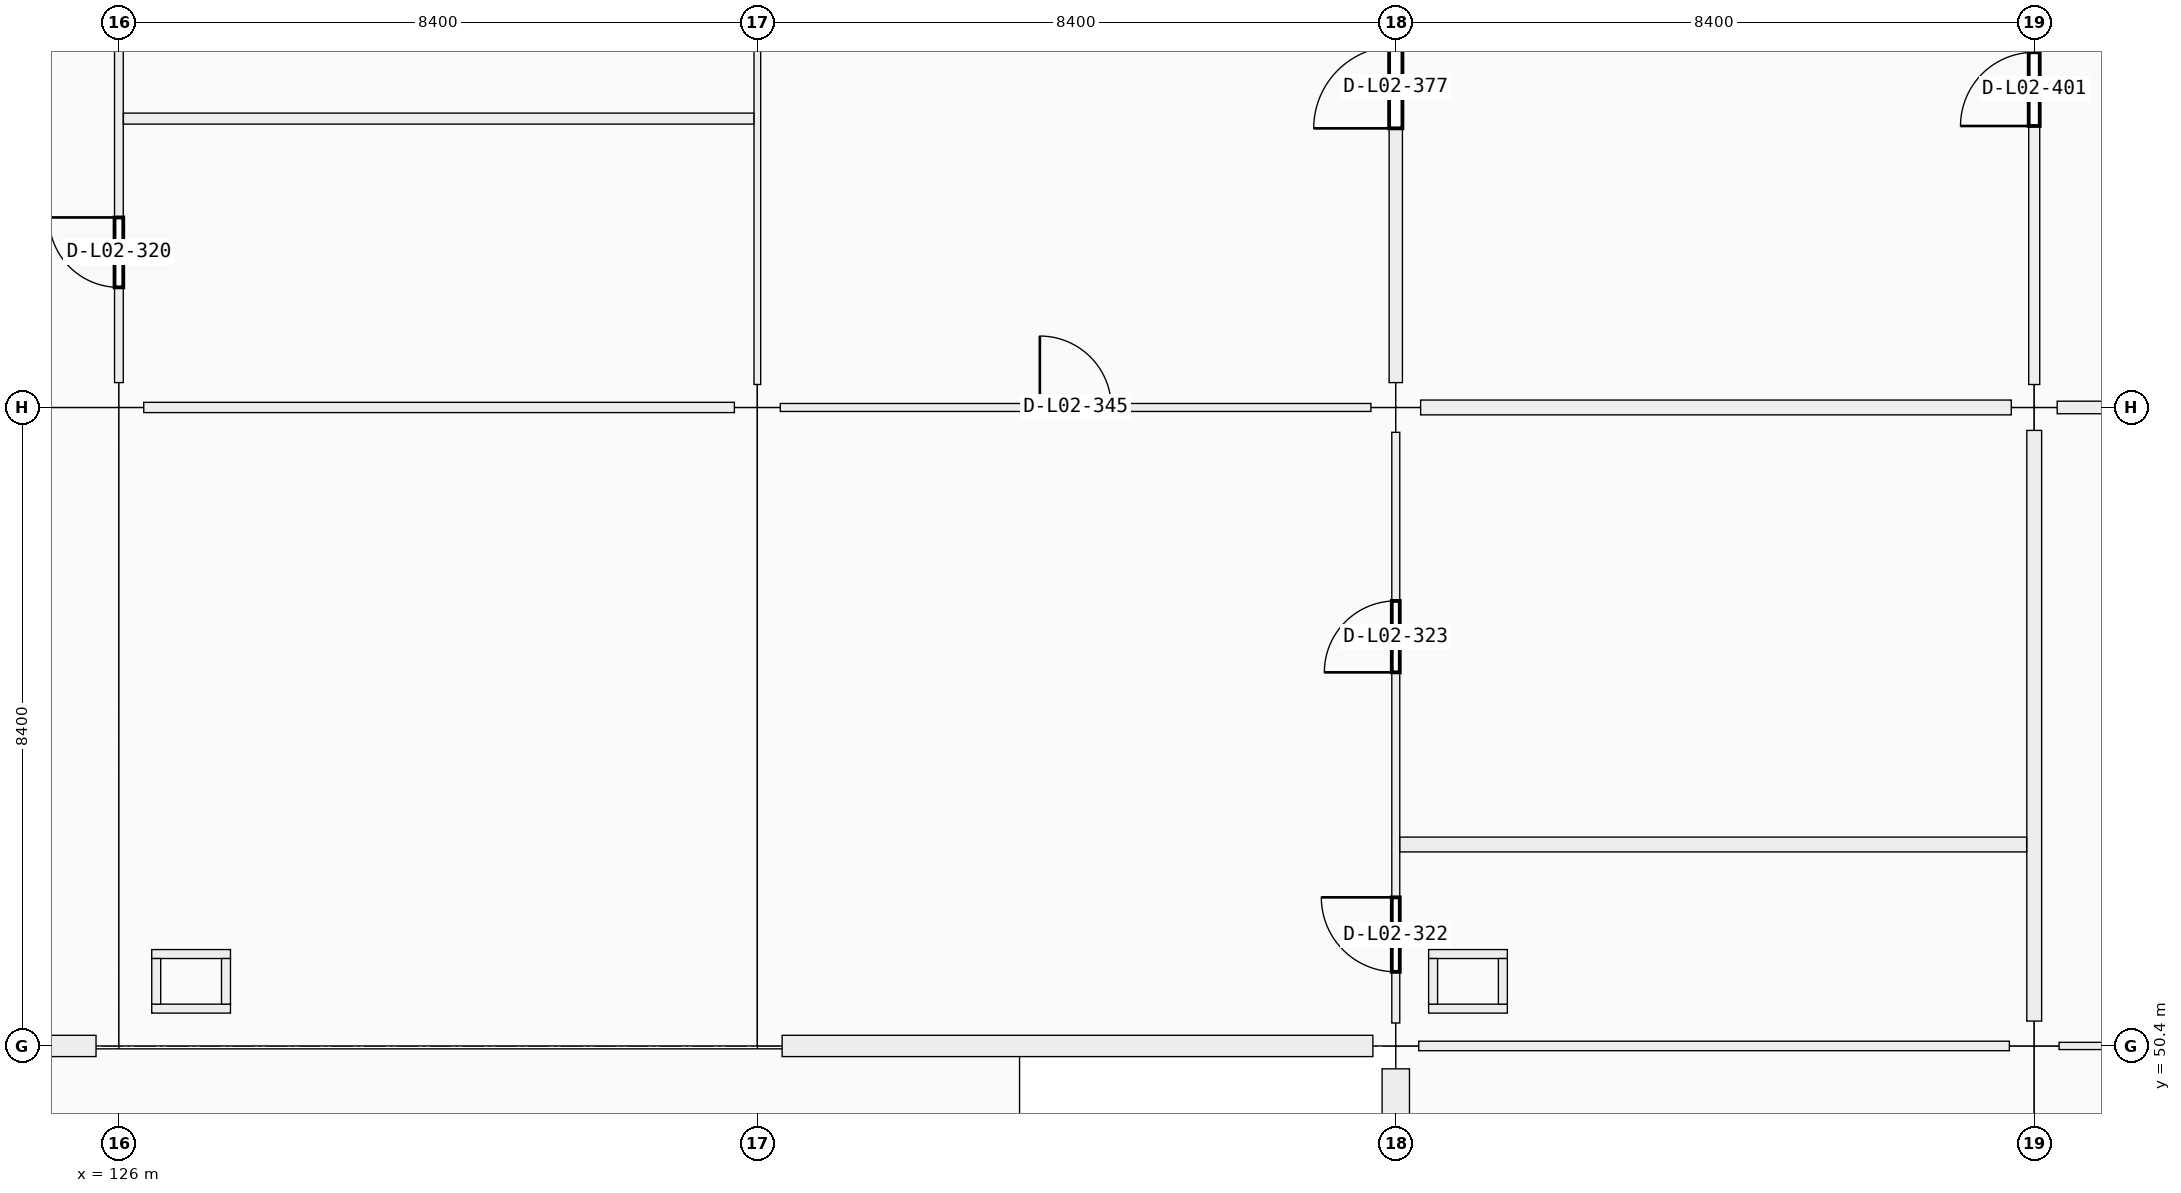
"""IFC4 building model, lengths in metres.
Left out: names, types, materials, properties, quantities, classifications, styles, units other than length and angle.
Written with IfcOpenShell. Run it as: python <this file> out.ifc"""

import sys

from ifc_helpers import new_model, si_unit, direction, frame, frame_2d, origin, origin_2d, place, context, subcontext, project, spatial, rectangle, extrude, element, fill, save


model = new_model("IFC4")
c1 = context("Model", 3, precision=1e-05, world=origin(), true_north=direction((0.0, 1.0)))
c2 = subcontext(c1, "Body", "Model", "MODEL_VIEW")
j1 = project(units=[si_unit("LENGTHUNIT", "METRE"), si_unit("PLANEANGLEUNIT", "RADIAN")], contexts=[c1])
p1 = place(None, origin())
s1 = spatial("IfcSite", under=j1, at=p1, CompositionType="ELEMENT")
p2 = place(p1, origin())
s2 = spatial("IfcBuilding", under=s1, at=p2, CompositionType="ELEMENT")
p3 = place(p2, frame((0.0, 0.0, 10.26)))
s3 = spatial("IfcBuildingStorey", under=s2, at=p3, CompositionType="ELEMENT", Elevation=10.26)
p4 = place(p3, frame((126.0, 50.4, 0.0), z_axis=(0.0, 0.0, 1.0), x_axis=(1.0, 0.0, 0.0)))
e1 = element("IfcColumn", 1, at=p4, inside=s3, PredefinedType="COLUMN", context=c2, shape_type="SweptSolid", body=[
    extrude(rectangle(XDim=0.6, YDim=0.6, at=origin_2d()), origin(), (0.0, 0.0, 1.0), 4.5),
])
for number, where, z_axis, x_axis in (
    (2, (126.0, 58.8, 0.0), (0.0, 0.0, 1.0), (1.0, 0.0, 0.0)),
    (3, (134.4, 50.4, 0.0), (0.0, 0.0, 1.0), (1.0, 0.0, 0.0)),
):
    element("IfcColumn", number, at=place(p3, frame(where, z_axis=z_axis, x_axis=x_axis)), inside=s3, PredefinedType="COLUMN", context=c2, shape_type="SweptSolid", body=[
        extrude(rectangle(XDim=0.65, YDim=0.65, at=origin_2d()), origin(), (0.0, 0.0, 1.0), 4.5),
    ])
for number, where, z_axis, x_axis in (
    (4, (134.4, 58.8, 0.0), (0.0, 0.0, 1.0), (1.0, 0.0, 0.0)),
    (5, (142.8, 50.4, 0.0), (0.0, 0.0, 1.0), (1.0, 0.0, 0.0)),
):
    element("IfcColumn", number, at=place(p3, frame(where, z_axis=z_axis, x_axis=x_axis)), inside=s3, PredefinedType="COLUMN", context=c2, shape_type="SweptSolid", body=[
        extrude(rectangle(XDim=0.6, YDim=0.6, at=origin_2d()), origin(), (0.0, 0.0, 1.0), 4.5),
    ])
for number, where, z_axis, x_axis in (
    (6, (142.8, 58.8, 0.0), (0.0, 0.0, 1.0), (1.0, 0.0, 0.0)),
    (7, (151.2, 50.4, 0.0), (0.0, 0.0, 1.0), (1.0, 0.0, 0.0)),
):
    element("IfcColumn", number, at=place(p3, frame(where, z_axis=z_axis, x_axis=x_axis)), inside=s3, PredefinedType="COLUMN", context=c2, shape_type="SweptSolid", body=[
        extrude(rectangle(XDim=0.65, YDim=0.65, at=origin_2d()), origin(), (0.0, 0.0, 1.0), 4.5),
    ])
p5 = place(p3, frame((151.2, 58.8, 0.0), z_axis=(0.0, 0.0, 1.0), x_axis=(1.0, 0.0, 0.0)))
e8 = element("IfcColumn", 8, at=p5, inside=s3, PredefinedType="COLUMN", context=c2, shape_type="SweptSolid", body=[
    extrude(rectangle(XDim=0.6, YDim=0.6, at=origin_2d()), origin(), (0.0, 0.0, 1.0), 4.5),
])
p6 = place(p3, frame((125.699, 50.4, 0.0), z_axis=(0.0, 0.0, 1.0), x_axis=(-1.0, 0.0, 0.0)))
e9 = element("IfcWall", 9, at=p6, inside=s3, PredefinedType="SOLIDWALL", context=c2, shape_type="SweptSolid", body=[
    extrude(rectangle(XDim=7.773, YDim=0.28, at=frame_2d((3.886, 0.0))), origin(), (0.0, 0.0, 1.0), 3.54),
])
p7 = place(p6, frame((2.611, 0.0, 0.9)))
e10 = element("IfcOpeningElement", 10, at=p7, cuts=e9, PredefinedType="OPENING", context=c2, shape_type="SweptSolid", body=[
    extrude(rectangle(XDim=2.55, YDim=1.95, at=frame_2d((1.275, 0.975))), frame((0.0, 0.14, 0.0), z_axis=(0.0, -1.0, 0.0), x_axis=(1.0, 0.0, 0.0)), (0.0, 0.0, 1.0), 0.28),
])
p8 = place(p3, frame((142.499, 50.4, 0.0), z_axis=(0.0, 0.0, 1.0), x_axis=(-1.0, 0.0, 0.0)))
e11 = element("IfcWall", 11, at=p8, inside=s3, PredefinedType="SOLIDWALL", context=c2, shape_type="SweptSolid", body=[
    extrude(rectangle(XDim=7.773, YDim=0.28, at=frame_2d((3.886, 0.0))), origin(), (0.0, 0.0, 1.0), 3.54),
])
p9 = place(p8, frame((2.911, 0.0, 0.9)))
e12 = element("IfcOpeningElement", 12, at=p9, cuts=e11, PredefinedType="OPENING", context=c2, shape_type="SweptSolid", body=[
    extrude(rectangle(XDim=1.95, YDim=1.6, at=frame_2d((0.975, 0.8))), frame((0.0, 0.14, 0.0), z_axis=(0.0, -1.0, 0.0), x_axis=(1.0, 0.0, 0.0)), (0.0, 0.0, 1.0), 0.28),
])
p10 = place(p3, frame((142.8, 42.326, 0.0), z_axis=(0.0, 0.0, 1.0), x_axis=(0.0, 1.0, 0.0)))
e13 = element("IfcWall", 13, at=p10, inside=s3, PredefinedType="SOLIDWALL", context=c2, shape_type="SweptSolid", body=[
    extrude(rectangle(XDim=7.773, YDim=0.36, at=frame_2d((3.887, 0.0))), origin(), (0.0, 0.0, 1.0), 3.54),
])
p11 = place(p10, frame((2.837, 0.0, 0.9)))
e14 = element("IfcOpeningElement", 14, at=p11, cuts=e13, PredefinedType="OPENING", context=c2, shape_type="SweptSolid", body=[
    extrude(rectangle(XDim=2.1, YDim=1.8, at=frame_2d((1.05, 0.9))), frame((0.0, 0.18, 0.0), z_axis=(0.0, -1.0, 0.0), x_axis=(1.0, 0.0, 0.0)), (0.0, 0.0, 1.0), 0.36),
])
for number, where, z_axis, x_axis in (
    (15, (126.432, 50.891, 0.0), (0.0, 0.0, 1.0), (1.0, 0.0, 0.0)),
    (16, (126.432, 51.609, 0.0), (0.0, 0.0, 1.0), (1.0, 0.0, 0.0)),
):
    element("IfcWall", number, at=place(p3, frame(where, z_axis=z_axis, x_axis=x_axis)), inside=s3, PredefinedType="PARTITIONING", context=c2, shape_type="SweptSolid", body=[
        extrude(rectangle(XDim=1.036, YDim=0.118, at=frame_2d((0.518, 0.0))), origin(), (0.0, 0.0, 1.0), 3.53),
    ])
for number, where, z_axis, x_axis in (
    (17, (126.491, 50.95, 0.0), (0.0, 0.0, 1.0), (0.0, 1.0, 0.0)),
    (18, (127.409, 50.95, 0.0), (0.0, 0.0, 1.0), (0.0, 1.0, 0.0)),
):
    element("IfcWall", number, at=place(p3, frame(where, z_axis=z_axis, x_axis=x_axis)), inside=s3, PredefinedType="PARTITIONING", context=c2, shape_type="SweptSolid", body=[
        extrude(rectangle(XDim=0.6, YDim=0.118, at=frame_2d((0.3, 0.0))), origin(), (0.0, 0.0, 1.0), 3.53),
    ])
for number, where, z_axis, x_axis in (
    (19, (143.232, 50.891, 0.0), (0.0, 0.0, 1.0), (1.0, 0.0, 0.0)),
    (20, (143.232, 51.609, 0.0), (0.0, 0.0, 1.0), (1.0, 0.0, 0.0)),
):
    element("IfcWall", number, at=place(p3, frame(where, z_axis=z_axis, x_axis=x_axis)), inside=s3, PredefinedType="PARTITIONING", context=c2, shape_type="SweptSolid", body=[
        extrude(rectangle(XDim=1.036, YDim=0.118, at=frame_2d((0.518, 0.0))), origin(), (0.0, 0.0, 1.0), 3.53),
    ])
for number, where, z_axis, x_axis in (
    (21, (143.291, 50.95, 0.0), (0.0, 0.0, 1.0), (0.0, 1.0, 0.0)),
    (22, (144.209, 50.95, 0.0), (0.0, 0.0, 1.0), (0.0, 1.0, 0.0)),
):
    element("IfcWall", number, at=place(p3, frame(where, z_axis=z_axis, x_axis=x_axis)), inside=s3, PredefinedType="PARTITIONING", context=c2, shape_type="SweptSolid", body=[
        extrude(rectangle(XDim=0.6, YDim=0.118, at=frame_2d((0.3, 0.0))), origin(), (0.0, 0.0, 1.0), 3.53),
    ])
p12 = place(p3, frame((126.327, 58.8, 0.0), z_axis=(0.0, 0.0, 1.0), x_axis=(1.0, 0.0, 0.0)))
e23 = element("IfcWall", 23, at=p12, inside=s3, PredefinedType="PARTITIONING", context=c2, shape_type="SweptSolid", body=[
    extrude(rectangle(XDim=7.771, YDim=0.135, at=frame_2d((3.885, 0.0))), origin(), (0.0, 0.0, 1.0), 3.37),
])
p13 = place(p3, frame((134.702, 58.8, 0.0), z_axis=(0.0, 0.0, 1.0), x_axis=(1.0, 0.0, 0.0)))
e24 = element("IfcWall", 24, at=p13, inside=s3, PredefinedType="PARTITIONING", context=c2, shape_type="SweptSolid", body=[
    extrude(rectangle(XDim=7.771, YDim=0.105, at=frame_2d((3.885, 0.0))), origin(), (0.0, 0.0, 1.0), 3.37),
])
p14 = place(p13, frame((3.415, 0.0, 0.0)))
e25 = element("IfcOpeningElement", 25, at=p14, cuts=e24, PredefinedType="OPENING", context=c2, shape_type="SweptSolid", body=[
    extrude(rectangle(XDim=0.94, YDim=2.15, at=frame_2d((0.47, 1.075))), frame((0.0, 0.052, 0.0), z_axis=(0.0, -1.0, 0.0), x_axis=(1.0, 0.0, 0.0)), (0.0, 0.0, 1.0), 0.105),
])
p15 = place(p3, frame((143.102, 50.4, 0.0), z_axis=(0.0, 0.0, 1.0), x_axis=(1.0, 0.0, 0.0)))
e26 = element("IfcWall", 26, at=p15, inside=s3, PredefinedType="PARTITIONING", context=c2, shape_type="SweptSolid", body=[
    extrude(rectangle(XDim=7.771, YDim=0.125, at=frame_2d((3.885, 0.0))), origin(), (0.0, 0.0, 1.0), 3.37),
])
p16 = place(p3, frame((143.127, 58.8, 0.0), z_axis=(0.0, 0.0, 1.0), x_axis=(1.0, 0.0, 0.0)))
e27 = element("IfcWall", 27, at=p16, inside=s3, PredefinedType="PARTITIONING", context=c2, shape_type="SweptSolid", body=[
    extrude(rectangle(XDim=7.771, YDim=0.195, at=frame_2d((3.885, 0.0))), origin(), (0.0, 0.0, 1.0), 3.37),
])
p17 = place(p3, frame((151.527, 50.4, 0.0), z_axis=(0.0, 0.0, 1.0), x_axis=(1.0, 0.0, 0.0)))
e28 = element("IfcWall", 28, at=p17, inside=s3, PredefinedType="PARTITIONING", context=c2, shape_type="SweptSolid", body=[
    extrude(rectangle(XDim=7.771, YDim=0.095, at=frame_2d((3.885, 0.0))), origin(), (0.0, 0.0, 1.0), 3.37),
])
p18 = place(p17, frame((3.405, 0.0, 0.0)))
e29 = element("IfcOpeningElement", 29, at=p18, cuts=e28, PredefinedType="OPENING", context=c2, shape_type="SweptSolid", body=[
    extrude(rectangle(XDim=0.96, YDim=2.18, at=frame_2d((0.48, 1.09))), frame((0.0, 0.047, 0.0), z_axis=(0.0, -1.0, 0.0), x_axis=(1.0, 0.0, 0.0)), (0.0, 0.0, 1.0), 0.095),
])
p19 = place(p3, frame((151.502, 58.8, 0.0), z_axis=(0.0, 0.0, 1.0), x_axis=(1.0, 0.0, 0.0)))
e30 = element("IfcWall", 30, at=p19, inside=s3, PredefinedType="PARTITIONING", context=c2, shape_type="SweptSolid", body=[
    extrude(rectangle(XDim=7.771, YDim=0.165, at=frame_2d((3.885, 0.0))), origin(), (0.0, 0.0, 1.0), 3.37),
])
p20 = place(p19, frame((3.415, 0.0, 0.0)))
e31 = element("IfcOpeningElement", 31, at=p20, cuts=e30, PredefinedType="OPENING", context=c2, shape_type="SweptSolid", body=[
    extrude(rectangle(XDim=0.94, YDim=2.15, at=frame_2d((0.47, 1.075))), frame((0.0, 0.083, 0.0), z_axis=(0.0, -1.0, 0.0), x_axis=(1.0, 0.0, 0.0)), (0.0, 0.0, 1.0), 0.165),
])
p21 = place(p3, frame((126.0, 59.127, 0.0), z_axis=(0.0, 0.0, 1.0), x_axis=(0.0, 1.0, 0.0)))
e32 = element("IfcWall", 32, at=p21, inside=s3, PredefinedType="PARTITIONING", context=c2, shape_type="SweptSolid", body=[
    extrude(rectangle(XDim=7.796, YDim=0.115, at=frame_2d((3.898, 0.0))), origin(), (0.0, 0.0, 1.0), 3.37),
])
p22 = place(p21, frame((1.253, 0.0, 0.0)))
e33 = element("IfcOpeningElement", 33, at=p22, cuts=e32, PredefinedType="OPENING", context=c2, shape_type="SweptSolid", body=[
    extrude(rectangle(XDim=0.92, YDim=2.15, at=frame_2d((0.46, 1.075))), frame((0.0, 0.058, 0.0), z_axis=(0.0, -1.0, 0.0), x_axis=(1.0, 0.0, 0.0)), (0.0, 0.0, 1.0), 0.115),
])
p23 = place(p21, frame((5.108, 0.0, 0.0)))
e34 = element("IfcOpeningElement", 34, at=p23, cuts=e32, PredefinedType="OPENING", context=c2, shape_type="SweptSolid", body=[
    extrude(rectangle(XDim=1.05, YDim=2.12, at=frame_2d((0.525, 1.06))), frame((0.0, 0.058, 0.0), z_axis=(0.0, -1.0, 0.0), x_axis=(1.0, 0.0, 0.0)), (0.0, 0.0, 1.0), 0.115),
])
p24 = place(p3, frame((134.4, 59.102, 0.0), z_axis=(0.0, 0.0, 1.0), x_axis=(0.0, 1.0, 0.0)))
e35 = element("IfcWall", 35, at=p24, inside=s3, PredefinedType="PARTITIONING", context=c2, shape_type="SweptSolid", body=[
    extrude(rectangle(XDim=7.821, YDim=0.088, at=frame_2d((3.911, 0.0))), origin(), (0.0, 0.0, 1.0), 3.37),
])
p25 = place(p3, frame((142.8, 50.702, 0.0), z_axis=(0.0, 0.0, 1.0), x_axis=(0.0, 1.0, 0.0)))
e36 = element("IfcWall", 36, at=p25, inside=s3, PredefinedType="PARTITIONING", context=c2, shape_type="SweptSolid", body=[
    extrude(rectangle(XDim=7.771, YDim=0.105, at=frame_2d((3.885, 0.0))), origin(), (0.0, 0.0, 1.0), 3.37),
])
p26 = place(p25, frame((0.673, 0.0, 0.0)))
e37 = element("IfcOpeningElement", 37, at=p26, cuts=e36, PredefinedType="OPENING", context=c2, shape_type="SweptSolid", body=[
    extrude(rectangle(XDim=0.98, YDim=2.08, at=frame_2d((0.49, 1.04))), frame((0.0, 0.052, 0.0), z_axis=(0.0, -1.0, 0.0), x_axis=(1.0, 0.0, 0.0)), (0.0, 0.0, 1.0), 0.105),
])
p27 = place(p25, frame((4.613, 0.0, 0.0)))
e38 = element("IfcOpeningElement", 38, at=p27, cuts=e36, PredefinedType="OPENING", context=c2, shape_type="SweptSolid", body=[
    extrude(rectangle(XDim=0.94, YDim=2.08, at=frame_2d((0.47, 1.04))), frame((0.0, 0.052, 0.0), z_axis=(0.0, -1.0, 0.0), x_axis=(1.0, 0.0, 0.0)), (0.0, 0.0, 1.0), 0.105),
])
p28 = place(p3, frame((142.8, 59.127, 0.0), z_axis=(0.0, 0.0, 1.0), x_axis=(0.0, 1.0, 0.0)))
e39 = element("IfcWall", 39, at=p28, inside=s3, PredefinedType="PARTITIONING", context=c2, shape_type="SweptSolid", body=[
    extrude(rectangle(XDim=7.771, YDim=0.175, at=frame_2d((3.885, 0.0))), origin(), (0.0, 0.0, 1.0), 3.37),
])
p29 = place(p28, frame((3.345, 0.0, 0.0)))
e40 = element("IfcOpeningElement", 40, at=p29, cuts=e39, PredefinedType="OPENING", context=c2, shape_type="SweptSolid", body=[
    extrude(rectangle(XDim=1.08, YDim=2.25, at=frame_2d((0.54, 1.125))), frame((0.0, 0.087, 0.0), z_axis=(0.0, -1.0, 0.0), x_axis=(1.0, 0.0, 0.0)), (0.0, 0.0, 1.0), 0.175),
])
p30 = place(p3, frame((151.2, 50.727, 0.0), z_axis=(0.0, 0.0, 1.0), x_axis=(0.0, 1.0, 0.0)))
e41 = element("IfcWall", 41, at=p30, inside=s3, PredefinedType="PARTITIONING", context=c2, shape_type="SweptSolid", body=[
    extrude(rectangle(XDim=7.771, YDim=0.195, at=frame_2d((3.885, 0.0))), origin(), (0.0, 0.0, 1.0), 3.37),
])
p31 = place(p3, frame((151.2, 59.102, 0.0), z_axis=(0.0, 0.0, 1.0), x_axis=(0.0, 1.0, 0.0)))
e42 = element("IfcWall", 42, at=p31, inside=s3, PredefinedType="PARTITIONING", context=c2, shape_type="SweptSolid", body=[
    extrude(rectangle(XDim=7.771, YDim=0.145, at=frame_2d((3.885, 0.0))), origin(), (0.0, 0.0, 1.0), 3.37),
])
p32 = place(p31, frame((3.401, 0.0, 0.0)))
e43 = element("IfcOpeningElement", 43, at=p32, cuts=e42, PredefinedType="OPENING", context=c2, shape_type="SweptSolid", body=[
    extrude(rectangle(XDim=0.97, YDim=2.12, at=frame_2d((0.485, 1.06))), frame((0.0, 0.073, 0.0), z_axis=(0.0, -1.0, 0.0), x_axis=(1.0, 0.0, 0.0)), (0.0, 0.0, 1.0), 0.145),
])
p33 = place(p3, frame((126.06, 62.6, 0.0), z_axis=(0.0, 0.0, 1.0), x_axis=(1.0, 0.0, 0.0)))
e44 = element("IfcWall", 44, at=p33, inside=s3, PredefinedType="PARTITIONING", context=c2, shape_type="SweptSolid", body=[
    extrude(rectangle(XDim=8.294, YDim=0.145, at=frame_2d((4.147, 0.0))), origin(), (0.0, 0.0, 1.0), 3.37),
])
p34 = place(p3, frame((142.854, 53.05, 0.0), z_axis=(0.0, 0.0, 1.0), x_axis=(1.0, 0.0, 0.0)))
e45 = element("IfcWall", 45, at=p34, inside=s3, PredefinedType="PARTITIONING", context=c2, shape_type="SweptSolid", body=[
    extrude(rectangle(XDim=8.246, YDim=0.195, at=frame_2d((4.123, 0.0))), origin(), (0.0, 0.0, 1.0), 3.37),
])
p35 = place(p9, origin())
e46 = element("IfcWindow", 46, at=p35, inside=s3, PartitioningType="SINGLE_PANEL", PredefinedType="WINDOW", context=c2, shape_type="SweptSolid", body=[
    extrude(rectangle(XDim=1.95, YDim=1.6, at=frame_2d((0.975, 0.8))), frame((0.0, 0.03, 0.0), z_axis=(0.0, -1.0, 0.0), x_axis=(1.0, 0.0, 0.0)), (0.0, 0.0, 1.0), 0.06),
])
fill(e12, e46)
p36 = place(p22, origin())
e47 = element("IfcDoor", 47, at=p36, inside=s3, OperationType="SINGLE_SWING_RIGHT", PredefinedType="DOOR", context=c2, shape_type="SweptSolid", body=[
    extrude(rectangle(XDim=0.92, YDim=2.15, at=frame_2d((0.46, 1.075))), frame((0.0, 0.025, 0.0), z_axis=(0.0, -1.0, 0.0), x_axis=(1.0, 0.0, 0.0)), (0.0, 0.0, 1.0), 0.05),
])
fill(e33, e47)
p37 = place(p26, origin())
e48 = element("IfcDoor", 48, at=p37, inside=s3, OperationType="SINGLE_SWING_RIGHT", PredefinedType="DOOR", context=c2, shape_type="SweptSolid", body=[
    extrude(rectangle(XDim=0.98, YDim=2.08, at=frame_2d((0.49, 1.04))), frame((0.0, 0.025, 0.0), z_axis=(0.0, -1.0, 0.0), x_axis=(1.0, 0.0, 0.0)), (0.0, 0.0, 1.0), 0.05),
])
fill(e37, e48)
p38 = place(p27, origin())
e49 = element("IfcDoor", 49, at=p38, inside=s3, OperationType="SINGLE_SWING_LEFT", PredefinedType="DOOR", context=c2, shape_type="SweptSolid", body=[
    extrude(rectangle(XDim=0.94, YDim=2.08, at=frame_2d((0.47, 1.04))), frame((0.0, 0.025, 0.0), z_axis=(0.0, -1.0, 0.0), x_axis=(1.0, 0.0, 0.0)), (0.0, 0.0, 1.0), 0.05),
])
fill(e38, e49)
p39 = place(p14, origin())
e50 = element("IfcDoor", 50, at=p39, inside=s3, OperationType="SINGLE_SWING_LEFT", PredefinedType="DOOR", context=c2, shape_type="SweptSolid", body=[
    extrude(rectangle(XDim=0.94, YDim=2.15, at=frame_2d((0.47, 1.075))), frame((0.0, 0.025, 0.0), z_axis=(0.0, -1.0, 0.0), x_axis=(1.0, 0.0, 0.0)), (0.0, 0.0, 1.0), 0.05),
])
fill(e25, e50)
p40 = place(p29, origin())
e51 = element("IfcDoor", 51, at=p40, inside=s3, OperationType="SINGLE_SWING_LEFT", PredefinedType="DOOR", context=c2, shape_type="SweptSolid", body=[
    extrude(rectangle(XDim=1.08, YDim=2.25, at=frame_2d((0.54, 1.125))), frame((0.0, 0.025, 0.0), z_axis=(0.0, -1.0, 0.0), x_axis=(1.0, 0.0, 0.0)), (0.0, 0.0, 1.0), 0.05),
])
fill(e40, e51)
p41 = place(p32, origin())
e52 = element("IfcDoor", 52, at=p41, inside=s3, OperationType="SINGLE_SWING_LEFT", PredefinedType="DOOR", context=c2, shape_type="SweptSolid", body=[
    extrude(rectangle(XDim=0.97, YDim=2.12, at=frame_2d((0.485, 1.06))), frame((0.0, 0.025, 0.0), z_axis=(0.0, -1.0, 0.0), x_axis=(1.0, 0.0, 0.0)), (0.0, 0.0, 1.0), 0.05),
])
fill(e43, e52)
save(model, sys.argv[1])
